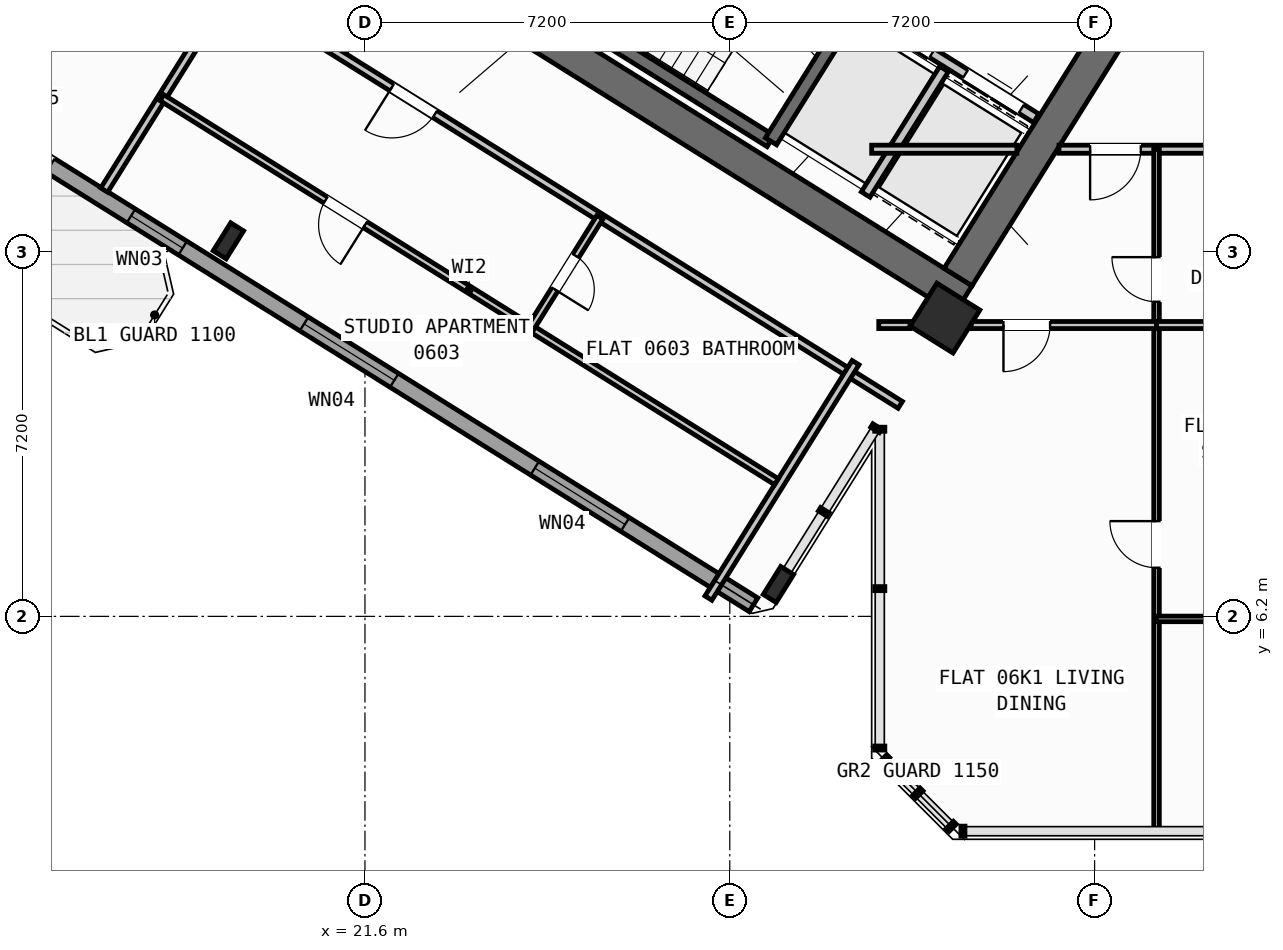
"""IFC4 building model, lengths in metres.
Left out: names, types, materials, properties, quantities, classifications, styles, units other than length and angle.
Written with IfcOpenShell. Run it as: python <this file> out.ifc"""

import sys

from ifc_helpers import new_model, si_unit, direction, frame, frame_2d, origin, origin_2d, place, context, subcontext, project, spatial, rectangle, hollow_rectangle, i_section, extrude, source, transform, mapped, element, fill, save


model = new_model("IFC4")
c1 = context("Model", 3, precision=1e-05, world=origin(), true_north=direction((0.0, 1.0)))
c2 = subcontext(c1, "Body", "Model", "MODEL_VIEW")
j1 = project(units=[si_unit("LENGTHUNIT", "METRE"), si_unit("PLANEANGLEUNIT", "RADIAN")], contexts=[c1])
p1 = place(None, origin())
s1 = spatial("IfcSite", under=j1, at=p1, CompositionType="ELEMENT")
p2 = place(p1, origin())
s2 = spatial("IfcBuilding", under=s1, at=p2, CompositionType="ELEMENT")
p3 = place(p2, frame((0.0, 0.0, 27.6)))
s3 = spatial("IfcBuildingStorey", under=s2, at=p3, CompositionType="ELEMENT", Elevation=27.6)
p4 = place(p3, frame((33.409, 12.45, 0.0), z_axis=(0.0, 0.0, 1.0), x_axis=(-0.848051132073, 0.529914405721, 0.0)))
e1 = element("IfcWall", 1, at=p4, inside=s3, PredefinedType="SHEAR", context=c2, shape_type="SweptSolid", body=[
    extrude(rectangle(XDim=13.24, YDim=0.65, at=frame_2d((6.62, 0.0))), origin(), (0.0, 0.0, 1.0), 3.35),
])
p5 = place(p3, frame((36.683, 18.304, 0.0), z_axis=(0.0, 0.0, 1.0), x_axis=(-0.529899109053, -0.848060690178, 0.0)))
e2 = element("IfcWall", 2, at=p5, inside=s3, PredefinedType="SHEAR", context=c2, shape_type="SweptSolid", body=[
    extrude(rectangle(XDim=6.375, YDim=0.65, at=frame_2d((3.188, 0.0))), origin(), (0.0, 0.0, 1.0), 3.35),
])
m1 = source(origin(), c2, "Body", "SweptSolid", [
    extrude(hollow_rectangle(XDim=1.0, YDim=1.0, WallThickness=0.04, at=origin_2d()), origin(), (0.0, 0.0, 1.0), 3.6),
])
p6 = place(p3, frame((33.046, 12.087, 0.0), z_axis=(0.0, 0.0, 1.0), x_axis=(-0.848048096156, 0.529919264233, 0.0)))
e3 = element("IfcColumn", 3, at=p6, inside=s3, PredefinedType="COLUMN", context=c2, shape_type="MappedRepresentation", body=[
    mapped(m1, transform((0.0, 0.0, 0.0), scale=1.0)),
])
m2 = source(origin(), c2, "Body", "SweptSolid", [
    extrude(i_section(OverallWidth=0.3, OverallDepth=0.65, WebThickness=0.016, FlangeThickness=0.031, at=origin_2d()), origin(), (0.0, 0.0, 1.0), 3.6),
])
for number, where, z_axis, x_axis in (
    (4, (29.761, 6.829, 0.0), (0.0, 0.0, 1.0), (-0.848, 0.53, 0.0)),
    (5, (18.906, 13.612, 0.0), (0.0, 0.0, 1.0), (-0.848, 0.53, 0.0)),
):
    element("IfcColumn", number, at=place(p3, frame(where, z_axis=z_axis, x_axis=x_axis)), inside=s3, PredefinedType="COLUMN", context=c2, shape_type="MappedRepresentation", body=[
        mapped(m2, transform((0.0, 0.0, 0.0), scale=1.0)),
    ])
p7 = place(p3, frame((29.268, 6.429, 0.0), z_axis=(0.0, 0.0, 1.0), x_axis=(-0.848049971435, 0.529916263149, 0.0)))
e6 = element("IfcWall", 6, at=p7, inside=s3, PredefinedType="STANDARD", context=c2, shape_type="SweptSolid", body=[
    extrude(rectangle(XDim=31.588, YDim=0.32, at=frame_2d((15.794, 0.0))), origin(), (0.0, 0.0, 1.0), 3.35),
])
p8 = place(p7, frame((16.362, 0.0, 0.0)))
e7 = element("IfcOpeningElement", 7, at=p8, cuts=e6, PredefinedType="OPENING", context=c2, shape_type="SweptSolid", body=[
    extrude(rectangle(XDim=1.2, YDim=2.15, at=frame_2d((0.6, 1.075))), frame((0.0, 0.17, 0.0), z_axis=(0.0, -1.0, 0.0), x_axis=(1.0, 0.0, 0.0)), (0.0, 0.0, 1.0), 0.34),
])
p9 = place(p7, frame((2.989, 0.0, 0.8)))
e8 = element("IfcOpeningElement", 8, at=p9, cuts=e6, PredefinedType="OPENING", context=c2, shape_type="SweptSolid", body=[
    extrude(rectangle(XDim=2.1, YDim=1.55, at=frame_2d((1.05, 0.775))), frame((0.0, 0.17, 0.0), z_axis=(0.0, -1.0, 0.0), x_axis=(1.0, 0.0, 0.0)), (0.0, 0.0, 1.0), 0.34),
])
p10 = place(p7, frame((8.359, 0.0, 0.8)))
e9 = element("IfcOpeningElement", 9, at=p10, cuts=e6, PredefinedType="OPENING", context=c2, shape_type="SweptSolid", body=[
    extrude(rectangle(XDim=2.1, YDim=1.55, at=frame_2d((1.05, 0.775))), frame((0.0, 0.17, 0.0), z_axis=(0.0, -1.0, 0.0), x_axis=(1.0, 0.0, 0.0)), (0.0, 0.0, 1.0), 0.34),
])
p11 = place(p7, frame((13.284, 0.0, 0.95)))
e10 = element("IfcOpeningElement", 10, at=p11, cuts=e6, PredefinedType="OPENING", context=c2, shape_type="SweptSolid", body=[
    extrude(rectangle(XDim=1.2, YDim=1.4, at=frame_2d((0.6, 0.7))), frame((0.0, 0.17, 0.0), z_axis=(0.0, -1.0, 0.0), x_axis=(1.0, 0.0, 0.0)), (0.0, 0.0, 1.0), 0.34),
])
p12 = place(p7, frame((29.188, 0.0, 0.95)))
e11 = element("IfcOpeningElement", 11, at=p12, cuts=e6, PredefinedType="OPENING", context=c2, shape_type="SweptSolid", body=[
    extrude(rectangle(XDim=1.2, YDim=1.4, at=frame_2d((0.6, 0.7))), frame((0.0, 0.17, 0.0), z_axis=(0.0, -1.0, 0.0), x_axis=(1.0, 0.0, 0.0)), (0.0, 0.0, 1.0), 0.34),
])
p13 = place(p7, frame((19.11, 0.0, 1.0)))
e12 = element("IfcOpeningElement", 12, at=p13, cuts=e6, PredefinedType="OPENING", context=c2, shape_type="SweptSolid", body=[
    extrude(rectangle(XDim=0.9, YDim=1.25, at=frame_2d((0.45, 0.625))), frame((0.0, 0.17, 0.0), z_axis=(0.0, -1.0, 0.0), x_axis=(1.0, 0.0, 0.0)), (0.0, 0.0, 1.0), 0.34),
])
p14 = place(p7, frame((21.226, 0.0, 1.0)))
e13 = element("IfcOpeningElement", 13, at=p14, cuts=e6, PredefinedType="OPENING", context=c2, shape_type="SweptSolid", body=[
    extrude(rectangle(XDim=0.9, YDim=1.25, at=frame_2d((0.45, 0.625))), frame((0.0, 0.17, 0.0), z_axis=(0.0, -1.0, 0.0), x_axis=(1.0, 0.0, 0.0)), (0.0, 0.0, 1.0), 0.34),
])
p15 = place(p7, frame((23.014, 0.0, 1.0)))
e14 = element("IfcOpeningElement", 14, at=p15, cuts=e6, PredefinedType="OPENING", context=c2, shape_type="SweptSolid", body=[
    extrude(rectangle(XDim=0.9, YDim=1.25, at=frame_2d((0.45, 0.625))), frame((0.0, 0.17, 0.0), z_axis=(0.0, -1.0, 0.0), x_axis=(1.0, 0.0, 0.0)), (0.0, 0.0, 1.0), 0.34),
])
p16 = place(p7, frame((24.802, 0.0, 1.0)))
e15 = element("IfcOpeningElement", 15, at=p16, cuts=e6, PredefinedType="OPENING", context=c2, shape_type="SweptSolid", body=[
    extrude(rectangle(XDim=0.9, YDim=1.25, at=frame_2d((0.45, 0.625))), frame((0.0, 0.17, 0.0), z_axis=(0.0, -1.0, 0.0), x_axis=(1.0, 0.0, 0.0)), (0.0, 0.0, 1.0), 0.34),
])
p17 = place(p7, frame((26.59, 0.0, 1.0)))
e16 = element("IfcOpeningElement", 16, at=p17, cuts=e6, PredefinedType="OPENING", context=c2, shape_type="SweptSolid", body=[
    extrude(rectangle(XDim=0.9, YDim=1.25, at=frame_2d((0.45, 0.625))), frame((0.0, 0.17, 0.0), z_axis=(0.0, -1.0, 0.0), x_axis=(1.0, 0.0, 0.0)), (0.0, 0.0, 1.0), 0.34),
])
p18 = place(p3, frame((29.605, 15.581, 0.0), z_axis=(0.0, 0.0, 1.0), x_axis=(-0.848036911448, 0.529937163087, 0.0)))
e17 = element("IfcWall", 17, at=p18, inside=s3, PredefinedType="SHEAR", context=c2, shape_type="SweptSolid", body=[
    extrude(rectangle(XDim=7.46, YDim=0.26, at=frame_2d((3.73, 0.0))), origin(), (0.0, 0.0, 1.0), 3.35),
])
p19 = place(p3, frame((31.288, 18.256, 0.0), z_axis=(0.0, 0.0, 1.0), x_axis=(-0.529943379326, -0.848033026897, 0.0)))
e18 = element("IfcWall", 18, at=p19, inside=s3, PredefinedType="SHEAR", context=c2, shape_type="SweptSolid", body=[
    extrude(rectangle(XDim=3.16, YDim=0.26, at=frame_2d((1.58, 0.0))), origin(), (0.0, 0.0, 1.0), 3.35),
])
p20 = place(p3, frame((34.848, 16.031, 0.0), z_axis=(0.0, 0.0, 1.0), x_axis=(-0.848044042236, 0.529925751807, 0.0)))
e19 = element("IfcWall", 19, at=p20, inside=s3, PredefinedType="STANDARD", context=c2, shape_type="SweptSolid", body=[
    extrude(rectangle(XDim=4.198, YDim=0.2, at=frame_2d((2.099, 0.0))), origin(), (0.0, 0.0, 1.0), 3.34),
])
p21 = place(p20, frame((0.348, 0.0, 0.0)))
e20 = element("IfcOpeningElement", 20, at=p21, cuts=e19, PredefinedType="OPENING", context=c2, shape_type="SweptSolid", body=[
    extrude(rectangle(XDim=1.3, YDim=2.2, at=frame_2d((0.65, 1.1))), frame((0.0, 0.11, 0.0), z_axis=(0.0, -1.0, 0.0), x_axis=(1.0, 0.0, 0.0)), (0.0, 0.0, 1.0), 0.22),
])
p22 = place(p20, frame((2.423, 0.0, 0.0)))
e21 = element("IfcOpeningElement", 21, at=p22, cuts=e19, PredefinedType="OPENING", context=c2, shape_type="SweptSolid", body=[
    extrude(rectangle(XDim=1.45, YDim=2.25, at=frame_2d((0.725, 1.125))), frame((0.0, 0.11, 0.0), z_axis=(0.0, -1.0, 0.0), x_axis=(1.0, 0.0, 0.0)), (0.0, 0.0, 1.0), 0.22),
])
p23 = place(p3, frame((33.029, 17.003, 0.0), z_axis=(0.0, 0.0, 1.0), x_axis=(-0.529916267533, -0.848049968695, 0.0)))
e22 = element("IfcWall", 22, at=p23, inside=s3, PredefinedType="STANDARD", context=c2, shape_type="SweptSolid", body=[
    extrude(rectangle(XDim=2.92, YDim=0.2, at=frame_2d((1.46, 0.0))), origin(), (0.0, 0.0, 1.0), 3.34),
])
p24 = place(p3, frame((21.206, 17.292, 0.0), z_axis=(0.0, 0.0, 1.0), x_axis=(-0.848050851465, 0.529914854792, 0.0)))
e23 = element("IfcWall", 23, at=p24, inside=s3, PredefinedType="PARTITIONING", context=c2, shape_type="SweptSolid", body=[
    extrude(rectangle(XDim=2.61, YDim=0.16, at=frame_2d((1.305, 0.0))), origin(), (0.0, 0.0, 1.0), 3.34),
])
p25 = place(p3, frame((24.588, 27.631, 0.0), z_axis=(0.0, 0.0, 1.0), x_axis=(-0.529914586043, -0.848051019396, 0.0)))
e24 = element("IfcWall", 24, at=p25, inside=s3, PredefinedType="PARTITIONING", context=c2, shape_type="SweptSolid", body=[
    extrude(rectangle(XDim=15.35, YDim=0.16, at=frame_2d((7.675, 0.0))), origin(), (0.0, 0.0, 1.0), 3.34),
])
p26 = place(p3, frame((16.492, 21.827, 0.0), z_axis=(0.0, 0.0, 1.0), x_axis=(-0.529904608059, -0.848057254175, 0.0)))
e25 = element("IfcWall", 25, at=p26, inside=s3, PredefinedType="PARTITIONING", context=c2, shape_type="SweptSolid", body=[
    extrude(rectangle(XDim=5.351, YDim=0.16, at=frame_2d((2.675, 0.0))), origin(), (0.0, 0.0, 1.0), 2.725),
])
p27 = place(p3, frame((17.537, 26.872, 0.0), z_axis=(0.0, 0.0, 1.0), x_axis=(-0.529922792977, -0.848045891142, 0.0)))
e26 = element("IfcWall", 26, at=p27, inside=s3, PredefinedType="PARTITIONING", context=c2, shape_type="SweptSolid", body=[
    extrude(rectangle(XDim=11.24, YDim=0.11, at=frame_2d((5.62, 0.0))), origin(), (0.0, 0.0, 1.0), 3.34),
])
p28 = place(p3, frame((32.164, 10.374, 0.0), z_axis=(0.0, 0.0, 1.0), x_axis=(-0.848044107957, 0.529925646633, 0.0)))
e27 = element("IfcWall", 27, at=p28, inside=s3, PredefinedType="PARTITIONING", context=c2, shape_type="SweptSolid", body=[
    extrude(rectangle(XDim=15.57, YDim=0.16, at=frame_2d((7.785, 0.0))), origin(), (0.0, 0.0, 1.0), 3.34),
])
p29 = place(p28, frame((10.83, 0.0, 0.0)))
e28 = element("IfcOpeningElement", 28, at=p29, cuts=e27, PredefinedType="OPENING", context=c2, shape_type="SweptSolid", body=[
    extrude(rectangle(XDim=1.0, YDim=2.1, at=frame_2d((0.5, 1.05))), frame((0.0, 0.09, 0.0), z_axis=(0.0, -1.0, 0.0), x_axis=(1.0, 0.0, 0.0)), (0.0, 0.0, 1.0), 0.18),
])
p30 = place(p3, frame((31.282, 11.208, 0.0), z_axis=(0.0, 0.0, 1.0), x_axis=(-0.529938869374, -0.84803584519, 0.0)))
e29 = element("IfcWall", 29, at=p30, inside=s3, PredefinedType="PARTITIONING", context=c2, shape_type="SweptSolid", body=[
    extrude(rectangle(XDim=5.48, YDim=0.16, at=frame_2d((2.74, 0.0))), origin(), (0.0, 0.0, 1.0), 3.34),
])
p31 = place(p3, frame((29.72, 8.859, 0.0), z_axis=(0.0, 0.0, 1.0), x_axis=(-0.848049134363, 0.529917602752, 0.0)))
e30 = element("IfcWall", 30, at=p31, inside=s3, PredefinedType="PLUMBINGWALL", context=c2, shape_type="SweptSolid", body=[
    extrude(rectangle(XDim=14.3, YDim=0.14, at=frame_2d((7.15, 0.0))), origin(), (0.0, 0.0, 1.0), 3.34),
])
p32 = place(p31, frame((9.57, 0.0, 0.0)))
e31 = element("IfcOpeningElement", 31, at=p32, cuts=e30, PredefinedType="OPENING", context=c2, shape_type="SweptSolid", body=[
    extrude(rectangle(XDim=0.92, YDim=2.08, at=frame_2d((0.46, 1.04))), frame((0.0, 0.08, 0.0), z_axis=(0.0, -1.0, 0.0), x_axis=(1.0, 0.0, 0.0)), (0.0, 0.0, 1.0), 0.16),
])
p33 = place(p3, frame((26.237, 14.078, 0.0), z_axis=(0.0, 0.0, 1.0), x_axis=(-0.52995640672, -0.848024885824, 0.0)))
e32 = element("IfcWall", 32, at=p33, inside=s3, PredefinedType="PLUMBINGWALL", context=c2, shape_type="SweptSolid", body=[
    extrude(rectangle(XDim=2.58, YDim=0.14, at=frame_2d((1.29, 0.0))), origin(), (0.0, 0.0, 1.0), 3.34),
])
p34 = place(p33, frame((0.9, 0.0, 0.0)))
e33 = element("IfcOpeningElement", 33, at=p34, cuts=e32, PredefinedType="OPENING", context=c2, shape_type="SweptSolid", body=[
    extrude(rectangle(XDim=0.78, YDim=2.05, at=frame_2d((0.39, 1.025))), frame((0.0, 0.08, 0.0), z_axis=(0.0, -1.0, 0.0), x_axis=(1.0, 0.0, 0.0)), (0.0, 0.0, 1.0), 0.16),
])
p35 = place(p3, frame((31.6, 15.42, 0.0), z_axis=(0.0, 0.0, 1.0), x_axis=(1.0, 0.0, 0.0)))
e34 = element("IfcWall", 34, at=p35, inside=s3, PredefinedType="PARTITIONING", context=c2, shape_type="SweptSolid", body=[
    extrude(rectangle(XDim=2.866, YDim=0.16, at=frame_2d((1.433, 0.0))), origin(), (0.0, 0.0, 1.0), 3.34),
])
p36 = place(p3, frame((35.296, 15.42, 0.0), z_axis=(0.0, 0.0, 1.0), x_axis=(1.0, 0.0, 0.0)))
e35 = element("IfcWall", 35, at=p36, inside=s3, PredefinedType="PARTITIONING", context=c2, shape_type="SweptSolid", body=[
    extrude(rectangle(XDim=15.311, YDim=0.16, at=frame_2d((7.655, 0.0))), origin(), (0.0, 0.0, 1.0), 3.34),
])
p37 = place(p36, frame((0.615, 0.0, 0.0)))
e36 = element("IfcOpeningElement", 36, at=p37, cuts=e35, PredefinedType="OPENING", context=c2, shape_type="SweptSolid", body=[
    extrude(rectangle(XDim=1.0, YDim=2.1, at=frame_2d((0.5, 1.05))), frame((0.0, 0.09, 0.0), z_axis=(0.0, -1.0, 0.0), x_axis=(1.0, 0.0, 0.0)), (0.0, 0.0, 1.0), 0.18),
])
p38 = place(p36, frame((9.035, 0.0, 0.0)))
e37 = element("IfcOpeningElement", 37, at=p38, cuts=e35, PredefinedType="OPENING", context=c2, shape_type="SweptSolid", body=[
    extrude(rectangle(XDim=1.0, YDim=2.1, at=frame_2d((0.5, 1.05))), frame((0.0, 0.09, 0.0), z_axis=(0.0, -1.0, 0.0), x_axis=(1.0, 0.0, 0.0)), (0.0, 0.0, 1.0), 0.18),
])
p39 = place(p3, frame((37.222, 1.96, 0.0), z_axis=(0.0, 0.0, 1.0), x_axis=(0.0, 1.0, 0.0)))
e38 = element("IfcWall", 38, at=p39, inside=s3, PredefinedType="PARTITIONING", context=c2, shape_type="SweptSolid", body=[
    extrude(rectangle(XDim=13.46, YDim=0.11, at=frame_2d((6.73, 0.0))), origin(), (0.0, 0.0, 1.0), 3.34),
])
p40 = place(p39, frame((5.2, 0.0, 0.0)))
e39 = element("IfcOpeningElement", 39, at=p40, cuts=e38, PredefinedType="OPENING", context=c2, shape_type="SweptSolid", body=[
    extrude(rectangle(XDim=0.92, YDim=2.08, at=frame_2d((0.46, 1.04))), frame((0.0, 0.065, 0.0), z_axis=(0.0, -1.0, 0.0), x_axis=(1.0, 0.0, 0.0)), (0.0, 0.0, 1.0), 0.13),
])
p41 = place(p39, frame((10.45, 0.0, 0.0)))
e40 = element("IfcOpeningElement", 40, at=p41, cuts=e38, PredefinedType="OPENING", context=c2, shape_type="SweptSolid", body=[
    extrude(rectangle(XDim=0.88, YDim=2.08, at=frame_2d((0.44, 1.04))), frame((0.0, 0.065, 0.0), z_axis=(0.0, -1.0, 0.0), x_axis=(1.0, 0.0, 0.0)), (0.0, 0.0, 1.0), 0.13),
])
p42 = place(p3, frame((31.74, 11.95, 0.0), z_axis=(0.0, 0.0, 1.0), x_axis=(1.0, 0.0, 0.0)))
e41 = element("IfcWall", 41, at=p42, inside=s3, PredefinedType="PLUMBINGWALL", context=c2, shape_type="SweptSolid", body=[
    extrude(rectangle(XDim=0.617, YDim=0.14, at=frame_2d((0.309, 0.0))), origin(), (0.0, 0.0, 1.0), 3.34),
])
p43 = place(p3, frame((33.564, 11.95, 0.0), z_axis=(0.0, 0.0, 1.0), x_axis=(1.0, 0.0, 0.0)))
e42 = element("IfcWall", 42, at=p43, inside=s3, PredefinedType="PLUMBINGWALL", context=c2, shape_type="SweptSolid", body=[
    extrude(rectangle(XDim=3.657, YDim=0.14, at=frame_2d((1.829, 0.0))), origin(), (0.0, 0.0, 1.0), 2.525),
])
p44 = place(p43, frame((0.637, 0.0, 0.0)))
e43 = element("IfcOpeningElement", 43, at=p44, cuts=e42, PredefinedType="OPENING", context=c2, shape_type="SweptSolid", body=[
    extrude(rectangle(XDim=0.92, YDim=2.08, at=frame_2d((0.46, 1.04))), frame((0.0, 0.08, 0.0), z_axis=(0.0, -1.0, 0.0), x_axis=(1.0, 0.0, 0.0)), (0.0, 0.0, 1.0), 0.16),
])
p45 = place(p3, frame((37.222, 11.95, 0.0), z_axis=(0.0, 0.0, 1.0), x_axis=(1.0, 0.0, 0.0)))
e44 = element("IfcWall", 44, at=p45, inside=s3, PredefinedType="PLUMBINGWALL", context=c2, shape_type="SweptSolid", body=[
    extrude(rectangle(XDim=4.728, YDim=0.14, at=frame_2d((2.364, 0.0))), origin(), (0.0, 0.0, 1.0), 2.525),
])
p46 = place(p3, frame((37.222, 6.15, 0.0), z_axis=(0.0, 0.0, 1.0), x_axis=(1.0, 0.0, 0.0)))
e45 = element("IfcWall", 45, at=p46, inside=s3, PredefinedType="PARTITIONING", context=c2, shape_type="SweptSolid", body=[
    extrude(rectangle(XDim=4.728, YDim=0.11, at=frame_2d((2.364, 0.0))), origin(), (0.0, 0.0, 1.0), 3.34),
])
p47 = place(p46, frame((1.904, 0.0, 0.0)))
e46 = element("IfcOpeningElement", 46, at=p47, cuts=e45, PredefinedType="OPENING", context=c2, shape_type="SweptSolid", body=[
    extrude(rectangle(XDim=0.92, YDim=2.08, at=frame_2d((0.46, 1.04))), frame((0.0, 0.065, 0.0), z_axis=(0.0, -1.0, 0.0), x_axis=(1.0, 0.0, 0.0)), (0.0, 0.0, 1.0), 0.13),
])
m3 = source(origin(), c2, "Body", "SweptSolid", [
    extrude(rectangle(XDim=2.1, YDim=1.55, at=frame_2d((1.05, 0.775))), frame((0.0, 0.03, 0.0), z_axis=(0.0, -1.0, 0.0), x_axis=(1.0, 0.0, 0.0)), (0.0, 0.0, 1.0), 0.06),
])
p48 = place(p9, origin())
e47 = element("IfcWindow", 47, at=p48, inside=s3, PartitioningType="SINGLE_PANEL", PredefinedType="WINDOW", context=c2, shape_type="MappedRepresentation", body=[
    mapped(m3, transform((0.0, 0.0, 0.0), scale=1.0)),
])
fill(e8, e47)
p49 = place(p10, origin())
e48 = element("IfcWindow", 48, at=p49, inside=s3, PartitioningType="SINGLE_PANEL", PredefinedType="WINDOW", context=c2, shape_type="MappedRepresentation", body=[
    mapped(m3, transform((0.0, 0.0, 0.0), scale=1.0)),
])
fill(e9, e48)
m4 = source(origin(), c2, "Body", "SweptSolid", [
    extrude(rectangle(XDim=1.2, YDim=1.4, at=frame_2d((0.6, 0.7))), frame((0.0, 0.03, 0.0), z_axis=(0.0, -1.0, 0.0), x_axis=(1.0, 0.0, 0.0)), (0.0, 0.0, 1.0), 0.06),
])
p50 = place(p11, origin())
e49 = element("IfcWindow", 49, at=p50, inside=s3, PartitioningType="SINGLE_PANEL", PredefinedType="WINDOW", context=c2, shape_type="MappedRepresentation", body=[
    mapped(m4, transform((0.0, 0.0, 0.0), scale=1.0)),
])
fill(e10, e49)
m5 = source(origin(), c2, "Body", "SweptSolid", [
    extrude(rectangle(XDim=1.3, YDim=2.2, at=frame_2d((0.65, 1.1))), frame((0.0, 0.025, 0.0), z_axis=(0.0, -1.0, 0.0), x_axis=(1.0, 0.0, 0.0)), (0.0, 0.0, 1.0), 0.05),
])
p51 = place(p21, origin())
e50 = element("IfcDoor", 50, at=p51, inside=s3, OperationType="DOUBLE_DOOR_SLIDING", PredefinedType="DOOR", context=c2, shape_type="MappedRepresentation", body=[
    mapped(m5, transform((0.0, 0.0, 0.0), scale=1.0)),
])
fill(e20, e50)
m6 = source(origin(), c2, "Body", "SweptSolid", [
    extrude(rectangle(XDim=1.45, YDim=2.25, at=frame_2d((0.725, 1.125))), frame((0.0, 0.025, 0.0), z_axis=(0.0, -1.0, 0.0), x_axis=(1.0, 0.0, 0.0)), (0.0, 0.0, 1.0), 0.05),
])
p52 = place(p22, origin())
e51 = element("IfcDoor", 51, at=p52, inside=s3, OperationType="DOUBLE_DOOR_SLIDING", PredefinedType="DOOR", context=c2, shape_type="MappedRepresentation", body=[
    mapped(m6, transform((0.0, 0.0, 0.0), scale=1.0)),
])
fill(e21, e51)
m7 = source(origin(), c2, "Body", "SweptSolid", [
    extrude(rectangle(XDim=1.0, YDim=2.1, at=frame_2d((0.5, 1.05))), frame((0.0, 0.025, 0.0), z_axis=(0.0, -1.0, 0.0), x_axis=(1.0, 0.0, 0.0)), (0.0, 0.0, 1.0), 0.05),
])
p53 = place(p29, origin())
e52 = element("IfcDoor", 52, at=p53, inside=s3, OperationType="SINGLE_SWING_RIGHT", PredefinedType="DOOR", context=c2, shape_type="MappedRepresentation", body=[
    mapped(m7, transform((0.0, 0.0, 0.0), scale=1.0)),
])
fill(e28, e52)
m8 = source(origin(), c2, "Body", "SweptSolid", [
    extrude(rectangle(XDim=0.92, YDim=2.08, at=frame_2d((0.46, 1.04))), frame((0.0, 0.025, 0.0), z_axis=(0.0, -1.0, 0.0), x_axis=(1.0, 0.0, 0.0)), (0.0, 0.0, 1.0), 0.05),
])
p54 = place(p32, origin())
e53 = element("IfcDoor", 53, at=p54, inside=s3, OperationType="SINGLE_SWING_LEFT", PredefinedType="DOOR", context=c2, shape_type="MappedRepresentation", body=[
    mapped(m8, transform((0.0, 0.0, 0.0), scale=1.0)),
])
fill(e31, e53)
m9 = source(origin(), c2, "Body", "SweptSolid", [
    extrude(rectangle(XDim=0.78, YDim=2.05, at=frame_2d((0.39, 1.025))), frame((0.0, 0.025, 0.0), z_axis=(0.0, -1.0, 0.0), x_axis=(1.0, 0.0, 0.0)), (0.0, 0.0, 1.0), 0.05),
])
p55 = place(p34, origin())
e54 = element("IfcDoor", 54, at=p55, inside=s3, OperationType="SINGLE_SWING_RIGHT", PredefinedType="DOOR", context=c2, shape_type="MappedRepresentation", body=[
    mapped(m9, transform((0.0, 0.0, 0.0), scale=1.0)),
])
fill(e33, e54)
p56 = place(p40, origin())
e55 = element("IfcDoor", 55, at=p56, inside=s3, OperationType="SINGLE_SWING_RIGHT", PredefinedType="DOOR", context=c2, shape_type="MappedRepresentation", body=[
    mapped(m8, transform((0.0, 0.0, 0.0), scale=1.0)),
])
fill(e39, e55)
p57 = place(p37, frame((1.0, 0.0, 0.0), z_axis=(0.0, 0.0, 1.0), x_axis=(-1.0, 0.0, 0.0)))
e56 = element("IfcDoor", 56, at=p57, inside=s3, OperationType="SINGLE_SWING_RIGHT", PredefinedType="DOOR", context=c2, shape_type="MappedRepresentation", body=[
    mapped(m7, transform((0.0, 0.0, 0.0), scale=1.0)),
])
fill(e36, e56)
p58 = place(p44, frame((0.92, 0.0, 0.0), z_axis=(0.0, 0.0, 1.0), x_axis=(-1.0, 0.0, 0.0)))
e57 = element("IfcDoor", 57, at=p58, inside=s3, OperationType="SINGLE_SWING_RIGHT", PredefinedType="DOOR", context=c2, shape_type="MappedRepresentation", body=[
    mapped(m8, transform((0.0, 0.0, 0.0), scale=1.0)),
])
fill(e43, e57)
m10 = source(origin(), c2, "Body", "SweptSolid", [
    extrude(rectangle(XDim=0.88, YDim=2.08, at=frame_2d((0.44, 1.04))), frame((0.0, 0.025, 0.0), z_axis=(0.0, -1.0, 0.0), x_axis=(1.0, 0.0, 0.0)), (0.0, 0.0, 1.0), 0.05),
])
p59 = place(p41, origin())
e58 = element("IfcDoor", 58, at=p59, inside=s3, OperationType="SINGLE_SWING_RIGHT", PredefinedType="DOOR", context=c2, shape_type="MappedRepresentation", body=[
    mapped(m10, transform((0.0, 0.0, 0.0), scale=1.0)),
])
fill(e40, e58)
save(model, sys.argv[1])
